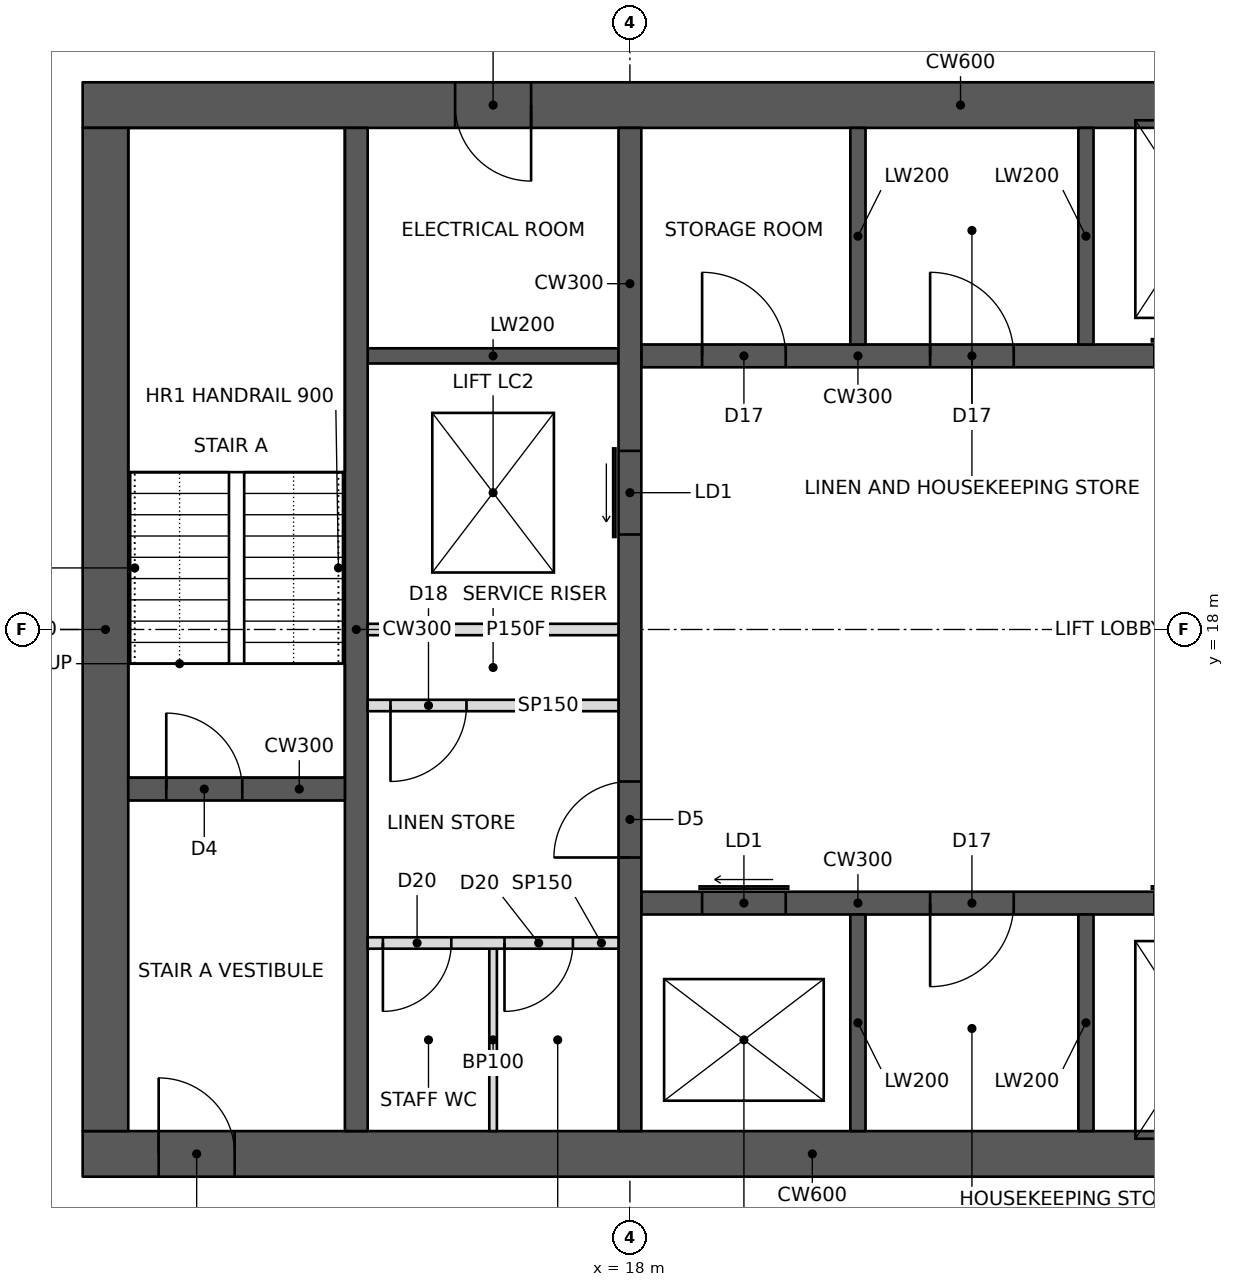
"""IFC4 building model, lengths in metres.
Left out: names, types, materials, properties, quantities, classifications, styles, units other than length and angle.
Written with IfcOpenShell. Run it as: python <this file> out.ifc"""

import sys

from ifc_helpers import new_model, si_unit, direction, frame, frame_2d, origin, place, context, subcontext, project, spatial, rectangle, extrude, element, fill, save


model = new_model("IFC4")
c1 = context("Model", 3, precision=1e-05, world=origin(), true_north=direction((0.0, 1.0)))
c2 = subcontext(c1, "Body", "Model", "MODEL_VIEW")
j1 = project(units=[si_unit("LENGTHUNIT", "METRE"), si_unit("PLANEANGLEUNIT", "RADIAN")], contexts=[c1])
p1 = place(None, origin())
s1 = spatial("IfcSite", under=j1, at=p1, CompositionType="ELEMENT")
p2 = place(p1, origin())
s2 = spatial("IfcBuilding", under=s1, at=p2, CompositionType="ELEMENT")
p3 = place(p2, frame((0.0, 0.0, 211.4)))
s3 = spatial("IfcBuildingStorey", under=s2, at=p3, CompositionType="ELEMENT", Elevation=211.4)
p4 = place(p3, frame((10.8, 11.1, 0.0), z_axis=(0.0, 0.0, 1.0), x_axis=(1.0, 0.0, 0.0)))
e1 = element("IfcWall", 1, at=p4, inside=s3, PredefinedType="SHEAR", context=c2, shape_type="SweptSolid", body=[
    extrude(rectangle(XDim=23.4, YDim=0.6, at=frame_2d((11.7, 0.0))), origin(), (0.0, 0.0, 1.0), 3.4),
])
p5 = place(p4, frame((1.0, 0.0, 0.0)))
e2 = element("IfcOpeningElement", 2, at=p5, cuts=e1, PredefinedType="OPENING", context=c2, shape_type="SweptSolid", body=[
    extrude(rectangle(XDim=1.0, YDim=2.1, at=frame_2d((0.5, 1.05))), frame((0.0, 0.31, 0.0), z_axis=(0.0, -1.0, 0.0), x_axis=(1.0, 0.0, 0.0)), (0.0, 0.0, 1.0), 0.62),
])
p6 = place(p4, frame((17.2, 0.0, 0.0)))
e3 = element("IfcOpeningElement", 3, at=p6, cuts=e1, PredefinedType="OPENING", context=c2, shape_type="SweptSolid", body=[
    extrude(rectangle(XDim=1.8, YDim=2.1, at=frame_2d((0.9, 1.05))), frame((0.0, 0.31, 0.0), z_axis=(0.0, -1.0, 0.0), x_axis=(1.0, 0.0, 0.0)), (0.0, 0.0, 1.0), 0.62),
])
p7 = place(p3, frame((10.8, 24.9, 0.0), z_axis=(0.0, 0.0, 1.0), x_axis=(1.0, 0.0, 0.0)))
e4 = element("IfcWall", 4, at=p7, inside=s3, PredefinedType="SHEAR", context=c2, shape_type="SweptSolid", body=[
    extrude(rectangle(XDim=23.4, YDim=0.6, at=frame_2d((11.7, 0.0))), origin(), (0.0, 0.0, 1.0), 3.4),
])
p8 = place(p7, frame((17.2, 0.0, 0.0)))
e5 = element("IfcOpeningElement", 5, at=p8, cuts=e4, PredefinedType="OPENING", context=c2, shape_type="SweptSolid", body=[
    extrude(rectangle(XDim=1.8, YDim=2.1, at=frame_2d((0.9, 1.05))), frame((0.0, 0.31, 0.0), z_axis=(0.0, -1.0, 0.0), x_axis=(1.0, 0.0, 0.0)), (0.0, 0.0, 1.0), 0.62),
])
p9 = place(p7, frame((21.1, 0.0, 0.0)))
e6 = element("IfcOpeningElement", 6, at=p9, cuts=e4, PredefinedType="OPENING", context=c2, shape_type="SweptSolid", body=[
    extrude(rectangle(XDim=1.0, YDim=2.1, at=frame_2d((0.5, 1.05))), frame((0.0, 0.31, 0.0), z_axis=(0.0, -1.0, 0.0), x_axis=(1.0, 0.0, 0.0)), (0.0, 0.0, 1.0), 0.62),
])
p10 = place(p7, frame((4.9, 0.0, 0.0)))
e7 = element("IfcOpeningElement", 7, at=p10, cuts=e4, PredefinedType="OPENING", context=c2, shape_type="SweptSolid", body=[
    extrude(rectangle(XDim=1.0, YDim=2.1, at=frame_2d((0.5, 1.05))), frame((0.0, 0.31, 0.0), z_axis=(0.0, -1.0, 0.0), x_axis=(1.0, 0.0, 0.0)), (0.0, 0.0, 1.0), 0.62),
])
p11 = place(p3, frame((11.1, 11.4, 0.0), z_axis=(0.0, 0.0, 1.0), x_axis=(0.0, 1.0, 0.0)))
e8 = element("IfcWall", 8, at=p11, inside=s3, PredefinedType="SHEAR", context=c2, shape_type="SweptSolid", body=[
    extrude(rectangle(XDim=13.2, YDim=0.6, at=frame_2d((6.6, 0.0))), origin(), (0.0, 0.0, 1.0), 3.4),
])
p12 = place(p3, frame((14.4, 11.4, 0.0), z_axis=(0.0, 0.0, 1.0), x_axis=(0.0, 1.0, 0.0)))
e9 = element("IfcWall", 9, at=p12, inside=s3, PredefinedType="SHEAR", context=c2, shape_type="SweptSolid", body=[
    extrude(rectangle(XDim=13.2, YDim=0.3, at=frame_2d((6.6, 0.0))), origin(), (0.0, 0.0, 1.0), 3.4),
])
p13 = place(p3, frame((11.4, 15.9, 0.0), z_axis=(0.0, 0.0, 1.0), x_axis=(1.0, 0.0, 0.0)))
e10 = element("IfcWall", 10, at=p13, inside=s3, PredefinedType="SHEAR", context=c2, shape_type="SweptSolid", body=[
    extrude(rectangle(XDim=2.85, YDim=0.3, at=frame_2d((1.425, 0.0))), origin(), (0.0, 0.0, 1.0), 3.4),
])
p14 = place(p13, frame((0.5, 0.0, 0.0)))
e11 = element("IfcOpeningElement", 11, at=p14, cuts=e10, PredefinedType="OPENING", context=c2, shape_type="SweptSolid", body=[
    extrude(rectangle(XDim=1.0, YDim=2.1, at=frame_2d((0.5, 1.05))), frame((0.0, 0.16, 0.0), z_axis=(0.0, -1.0, 0.0), x_axis=(1.0, 0.0, 0.0)), (0.0, 0.0, 1.0), 0.32),
])
p15 = place(p3, frame((18.0, 11.4, 0.0), z_axis=(0.0, 0.0, 1.0), x_axis=(0.0, 1.0, 0.0)))
e12 = element("IfcWall", 12, at=p15, inside=s3, PredefinedType="SHEAR", context=c2, shape_type="SweptSolid", body=[
    extrude(rectangle(XDim=13.2, YDim=0.3, at=frame_2d((6.6, 0.0))), origin(), (0.0, 0.0, 1.0), 3.4),
])
p16 = place(p15, frame((3.6, 0.0, 0.0)))
e13 = element("IfcOpeningElement", 13, at=p16, cuts=e12, PredefinedType="OPENING", context=c2, shape_type="SweptSolid", body=[
    extrude(rectangle(XDim=1.0, YDim=2.1, at=frame_2d((0.5, 1.05))), frame((0.0, 0.16, 0.0), z_axis=(0.0, -1.0, 0.0), x_axis=(1.0, 0.0, 0.0)), (0.0, 0.0, 1.0), 0.32),
])
p17 = place(p15, frame((7.85, 0.0, 0.0)))
e14 = element("IfcOpeningElement", 14, at=p17, cuts=e12, PredefinedType="OPENING", context=c2, shape_type="SweptSolid", body=[
    extrude(rectangle(XDim=1.1, YDim=2.1, at=frame_2d((0.55, 1.05))), frame((0.0, 0.16, 0.0), z_axis=(0.0, -1.0, 0.0), x_axis=(1.0, 0.0, 0.0)), (0.0, 0.0, 1.0), 0.32),
])
p18 = place(p3, frame((14.55, 18.0, 0.0), z_axis=(0.0, 0.0, 1.0), x_axis=(1.0, 0.0, 0.0)))
e15 = element("IfcWall", 15, at=p18, inside=s3, PredefinedType="PARTITIONING", context=c2, shape_type="SweptSolid", body=[
    extrude(rectangle(XDim=3.3, YDim=0.15, at=frame_2d((1.65, 0.0))), origin(), (0.0, 0.0, 1.0), 3.2),
])
p19 = place(p3, frame((18.15, 14.4, 0.0), z_axis=(0.0, 0.0, 1.0), x_axis=(1.0, 0.0, 0.0)))
e16 = element("IfcWall", 16, at=p19, inside=s3, PredefinedType="SHEAR", context=c2, shape_type="SweptSolid", body=[
    extrude(rectangle(XDim=9.0, YDim=0.3, at=frame_2d((4.5, 0.0))), origin(), (0.0, 0.0, 1.0), 3.4),
])
p20 = place(p19, frame((0.8, 0.0, 0.0)))
e17 = element("IfcOpeningElement", 17, at=p20, cuts=e16, PredefinedType="OPENING", context=c2, shape_type="SweptSolid", body=[
    extrude(rectangle(XDim=1.1, YDim=2.1, at=frame_2d((0.55, 1.05))), frame((0.0, 0.16, 0.0), z_axis=(0.0, -1.0, 0.0), x_axis=(1.0, 0.0, 0.0)), (0.0, 0.0, 1.0), 0.32),
])
p21 = place(p19, frame((6.75, 0.0, 0.0)))
e18 = element("IfcOpeningElement", 18, at=p21, cuts=e16, PredefinedType="OPENING", context=c2, shape_type="SweptSolid", body=[
    extrude(rectangle(XDim=1.2, YDim=2.1, at=frame_2d((0.6, 1.05))), frame((0.0, 0.16, 0.0), z_axis=(0.0, -1.0, 0.0), x_axis=(1.0, 0.0, 0.0)), (0.0, 0.0, 1.0), 0.32),
])
p22 = place(p19, frame((3.8, 0.0, 0.0)))
e19 = element("IfcOpeningElement", 19, at=p22, cuts=e16, PredefinedType="OPENING", context=c2, shape_type="SweptSolid", body=[
    extrude(rectangle(XDim=1.1, YDim=2.1, at=frame_2d((0.55, 1.05))), frame((0.0, 0.16, 0.0), z_axis=(0.0, -1.0, 0.0), x_axis=(1.0, 0.0, 0.0)), (0.0, 0.0, 1.0), 0.32),
])
for number, where, z_axis, x_axis in (
    (20, (21.0, 11.4, 0.0), (0.0, 0.0, 1.0), (0.0, 1.0, 0.0)),
    (21, (24.0, 11.4, 0.0), (0.0, 0.0, 1.0), (0.0, 1.0, 0.0)),
):
    element("IfcWall", number, at=place(p3, frame(where, z_axis=z_axis, x_axis=x_axis)), inside=s3, PredefinedType="SHEAR", context=c2, shape_type="SweptSolid", body=[
        extrude(rectangle(XDim=2.85, YDim=0.2, at=frame_2d((1.425, 0.0))), origin(), (0.0, 0.0, 1.0), 3.4),
    ])
p23 = place(p3, frame((18.15, 21.6, 0.0), z_axis=(0.0, 0.0, 1.0), x_axis=(1.0, 0.0, 0.0)))
e22 = element("IfcWall", 22, at=p23, inside=s3, PredefinedType="SHEAR", context=c2, shape_type="SweptSolid", body=[
    extrude(rectangle(XDim=9.0, YDim=0.3, at=frame_2d((4.5, 0.0))), origin(), (0.0, 0.0, 1.0), 3.4),
])
p24 = place(p23, frame((6.75, 0.0, 0.0)))
e23 = element("IfcOpeningElement", 23, at=p24, cuts=e22, PredefinedType="OPENING", context=c2, shape_type="SweptSolid", body=[
    extrude(rectangle(XDim=1.2, YDim=2.1, at=frame_2d((0.6, 1.05))), frame((0.0, 0.16, 0.0), z_axis=(0.0, -1.0, 0.0), x_axis=(1.0, 0.0, 0.0)), (0.0, 0.0, 1.0), 0.32),
])
p25 = place(p23, frame((0.8, 0.0, 0.0)))
e24 = element("IfcOpeningElement", 24, at=p25, cuts=e22, PredefinedType="OPENING", context=c2, shape_type="SweptSolid", body=[
    extrude(rectangle(XDim=1.1, YDim=2.1, at=frame_2d((0.55, 1.05))), frame((0.0, 0.16, 0.0), z_axis=(0.0, -1.0, 0.0), x_axis=(1.0, 0.0, 0.0)), (0.0, 0.0, 1.0), 0.32),
])
p26 = place(p23, frame((3.8, 0.0, 0.0)))
e25 = element("IfcOpeningElement", 25, at=p26, cuts=e22, PredefinedType="OPENING", context=c2, shape_type="SweptSolid", body=[
    extrude(rectangle(XDim=1.1, YDim=2.1, at=frame_2d((0.55, 1.05))), frame((0.0, 0.16, 0.0), z_axis=(0.0, -1.0, 0.0), x_axis=(1.0, 0.0, 0.0)), (0.0, 0.0, 1.0), 0.32),
])
for number, where, z_axis, x_axis in (
    (26, (21.0, 21.75, 0.0), (0.0, 0.0, 1.0), (0.0, 1.0, 0.0)),
    (27, (24.0, 21.75, 0.0), (0.0, 0.0, 1.0), (0.0, 1.0, 0.0)),
):
    element("IfcWall", number, at=place(p3, frame(where, z_axis=z_axis, x_axis=x_axis)), inside=s3, PredefinedType="SHEAR", context=c2, shape_type="SweptSolid", body=[
        extrude(rectangle(XDim=2.85, YDim=0.2, at=frame_2d((1.425, 0.0))), origin(), (0.0, 0.0, 1.0), 3.4),
    ])
p27 = place(p3, frame((14.55, 21.6, 0.0), z_axis=(0.0, 0.0, 1.0), x_axis=(1.0, 0.0, 0.0)))
e28 = element("IfcWall", 28, at=p27, inside=s3, PredefinedType="SHEAR", context=c2, shape_type="SweptSolid", body=[
    extrude(rectangle(XDim=3.3, YDim=0.2, at=frame_2d((1.65, 0.0))), origin(), (0.0, 0.0, 1.0), 3.4),
])
p28 = place(p3, frame((14.55, 17.0, 0.0), z_axis=(0.0, 0.0, 1.0), x_axis=(1.0, 0.0, 0.0)))
e29 = element("IfcWall", 29, at=p28, inside=s3, PredefinedType="PARTITIONING", context=c2, shape_type="SweptSolid", body=[
    extrude(rectangle(XDim=3.3, YDim=0.15, at=frame_2d((1.65, 0.0))), origin(), (0.0, 0.0, 1.0), 3.2),
])
p29 = place(p28, frame((0.3, 0.0, 0.0)))
e30 = element("IfcOpeningElement", 30, at=p29, cuts=e29, PredefinedType="OPENING", context=c2, shape_type="SweptSolid", body=[
    extrude(rectangle(XDim=1.0, YDim=2.1, at=frame_2d((0.5, 1.05))), frame((0.0, 0.085, 0.0), z_axis=(0.0, -1.0, 0.0), x_axis=(1.0, 0.0, 0.0)), (0.0, 0.0, 1.0), 0.17),
])
p30 = place(p3, frame((14.55, 13.875, 0.0), z_axis=(0.0, 0.0, 1.0), x_axis=(1.0, 0.0, 0.0)))
e31 = element("IfcWall", 31, at=p30, inside=s3, PredefinedType="PARTITIONING", context=c2, shape_type="SweptSolid", body=[
    extrude(rectangle(XDim=3.3, YDim=0.15, at=frame_2d((1.65, 0.0))), origin(), (0.0, 0.0, 1.0), 3.2),
])
p31 = place(p30, frame((0.2, 0.0, 0.0)))
e32 = element("IfcOpeningElement", 32, at=p31, cuts=e31, PredefinedType="OPENING", context=c2, shape_type="SweptSolid", body=[
    extrude(rectangle(XDim=0.9, YDim=2.1, at=frame_2d((0.45, 1.05))), frame((0.0, 0.085, 0.0), z_axis=(0.0, -1.0, 0.0), x_axis=(1.0, 0.0, 0.0)), (0.0, 0.0, 1.0), 0.17),
])
p32 = place(p30, frame((1.8, 0.0, 0.0)))
e33 = element("IfcOpeningElement", 33, at=p32, cuts=e31, PredefinedType="OPENING", context=c2, shape_type="SweptSolid", body=[
    extrude(rectangle(XDim=0.9, YDim=2.1, at=frame_2d((0.45, 1.05))), frame((0.0, 0.085, 0.0), z_axis=(0.0, -1.0, 0.0), x_axis=(1.0, 0.0, 0.0)), (0.0, 0.0, 1.0), 0.17),
])
p33 = place(p3, frame((16.2, 11.4, 0.0), z_axis=(0.0, 0.0, 1.0), x_axis=(0.0, 1.0, 0.0)))
e34 = element("IfcWall", 34, at=p33, inside=s3, PredefinedType="PARTITIONING", context=c2, shape_type="SweptSolid", body=[
    extrude(rectangle(XDim=2.4, YDim=0.1, at=frame_2d((1.2, 0.0))), origin(), (0.0, 0.0, 1.0), 3.2),
])
p34 = place(p29, frame((1.0, 0.0, 0.0), z_axis=(0.0, 0.0, 1.0), x_axis=(-1.0, 0.0, 0.0)))
e35 = element("IfcDoor", 35, at=p34, inside=s3, OperationType="SINGLE_SWING_RIGHT", PredefinedType="DOOR", context=c2, shape_type="SweptSolid", body=[
    extrude(rectangle(XDim=1.0, YDim=2.1, at=frame_2d((0.5, 1.05))), frame((0.0, 0.025, 0.0), z_axis=(0.0, -1.0, 0.0), x_axis=(1.0, 0.0, 0.0)), (0.0, 0.0, 1.0), 0.05),
])
fill(e30, e35)
p35 = place(p31, frame((0.9, 0.0, 0.0), z_axis=(0.0, 0.0, 1.0), x_axis=(-1.0, 0.0, 0.0)))
e36 = element("IfcDoor", 36, at=p35, inside=s3, OperationType="SINGLE_SWING_RIGHT", PredefinedType="DOOR", context=c2, shape_type="SweptSolid", body=[
    extrude(rectangle(XDim=0.9, YDim=2.1, at=frame_2d((0.45, 1.05))), frame((0.0, 0.025, 0.0), z_axis=(0.0, -1.0, 0.0), x_axis=(1.0, 0.0, 0.0)), (0.0, 0.0, 1.0), 0.05),
])
fill(e32, e36)
p36 = place(p32, frame((0.9, 0.0, 0.0), z_axis=(0.0, 0.0, 1.0), x_axis=(-1.0, 0.0, 0.0)))
e37 = element("IfcDoor", 37, at=p36, inside=s3, OperationType="SINGLE_SWING_RIGHT", PredefinedType="DOOR", context=c2, shape_type="SweptSolid", body=[
    extrude(rectangle(XDim=0.9, YDim=2.1, at=frame_2d((0.45, 1.05))), frame((0.0, 0.025, 0.0), z_axis=(0.0, -1.0, 0.0), x_axis=(1.0, 0.0, 0.0)), (0.0, 0.0, 1.0), 0.05),
])
fill(e33, e37)
p37 = place(p5, origin())
e38 = element("IfcDoor", 38, at=p37, inside=s3, OperationType="SINGLE_SWING_LEFT", PredefinedType="DOOR", context=c2, shape_type="SweptSolid", body=[
    extrude(rectangle(XDim=1.0, YDim=2.1, at=frame_2d((0.5, 1.05))), frame((0.0, 0.025, 0.0), z_axis=(0.0, -1.0, 0.0), x_axis=(1.0, 0.0, 0.0)), (0.0, 0.0, 1.0), 0.05),
])
fill(e2, e38)
p38 = place(p14, origin())
e39 = element("IfcDoor", 39, at=p38, inside=s3, OperationType="SINGLE_SWING_LEFT", PredefinedType="DOOR", context=c2, shape_type="SweptSolid", body=[
    extrude(rectangle(XDim=1.0, YDim=2.1, at=frame_2d((0.5, 1.05))), frame((0.0, 0.025, 0.0), z_axis=(0.0, -1.0, 0.0), x_axis=(1.0, 0.0, 0.0)), (0.0, 0.0, 1.0), 0.05),
])
fill(e11, e39)
p39 = place(p16, origin())
e40 = element("IfcDoor", 40, at=p39, inside=s3, OperationType="SINGLE_SWING_LEFT", PredefinedType="DOOR", context=c2, shape_type="SweptSolid", body=[
    extrude(rectangle(XDim=1.0, YDim=2.1, at=frame_2d((0.5, 1.05))), frame((0.0, 0.025, 0.0), z_axis=(0.0, -1.0, 0.0), x_axis=(1.0, 0.0, 0.0)), (0.0, 0.0, 1.0), 0.05),
])
fill(e13, e40)
p40 = place(p10, frame((1.0, 0.0, 0.0), z_axis=(0.0, 0.0, 1.0), x_axis=(-1.0, 0.0, 0.0)))
e41 = element("IfcDoor", 41, at=p40, inside=s3, OperationType="SINGLE_SWING_LEFT", PredefinedType="DOOR", context=c2, shape_type="SweptSolid", body=[
    extrude(rectangle(XDim=1.0, YDim=2.1, at=frame_2d((0.5, 1.05))), frame((0.0, 0.025, 0.0), z_axis=(0.0, -1.0, 0.0), x_axis=(1.0, 0.0, 0.0)), (0.0, 0.0, 1.0), 0.05),
])
fill(e7, e41)
p41 = place(p20, origin())
e42 = element("IfcDoor", 42, at=p41, inside=s3, OperationType="SLIDING_TO_LEFT", PredefinedType="DOOR", context=c2, shape_type="SweptSolid", body=[
    extrude(rectangle(XDim=1.1, YDim=2.1, at=frame_2d((0.55, 1.05))), frame((0.0, 0.025, 0.0), z_axis=(0.0, -1.0, 0.0), x_axis=(1.0, 0.0, 0.0)), (0.0, 0.0, 1.0), 0.05),
])
fill(e17, e42)
p42 = place(p17, origin())
e43 = element("IfcDoor", 43, at=p42, inside=s3, OperationType="SLIDING_TO_LEFT", PredefinedType="DOOR", context=c2, shape_type="SweptSolid", body=[
    extrude(rectangle(XDim=1.1, YDim=2.1, at=frame_2d((0.55, 1.05))), frame((0.0, 0.025, 0.0), z_axis=(0.0, -1.0, 0.0), x_axis=(1.0, 0.0, 0.0)), (0.0, 0.0, 1.0), 0.05),
])
fill(e14, e43)
p43 = place(p25, origin())
e44 = element("IfcDoor", 44, at=p43, inside=s3, OperationType="SINGLE_SWING_LEFT", PredefinedType="DOOR", context=c2, shape_type="SweptSolid", body=[
    extrude(rectangle(XDim=1.1, YDim=2.1, at=frame_2d((0.55, 1.05))), frame((0.0, 0.025, 0.0), z_axis=(0.0, -1.0, 0.0), x_axis=(1.0, 0.0, 0.0)), (0.0, 0.0, 1.0), 0.05),
])
fill(e24, e44)
p44 = place(p26, origin())
e45 = element("IfcDoor", 45, at=p44, inside=s3, OperationType="SINGLE_SWING_LEFT", PredefinedType="DOOR", context=c2, shape_type="SweptSolid", body=[
    extrude(rectangle(XDim=1.1, YDim=2.1, at=frame_2d((0.55, 1.05))), frame((0.0, 0.025, 0.0), z_axis=(0.0, -1.0, 0.0), x_axis=(1.0, 0.0, 0.0)), (0.0, 0.0, 1.0), 0.05),
])
fill(e25, e45)
p45 = place(p22, frame((1.1, 0.0, 0.0), z_axis=(0.0, 0.0, 1.0), x_axis=(-1.0, 0.0, 0.0)))
e46 = element("IfcDoor", 46, at=p45, inside=s3, OperationType="SINGLE_SWING_RIGHT", PredefinedType="DOOR", context=c2, shape_type="SweptSolid", body=[
    extrude(rectangle(XDim=1.1, YDim=2.1, at=frame_2d((0.55, 1.05))), frame((0.0, 0.025, 0.0), z_axis=(0.0, -1.0, 0.0), x_axis=(1.0, 0.0, 0.0)), (0.0, 0.0, 1.0), 0.05),
])
fill(e19, e46)
save(model, sys.argv[1])
